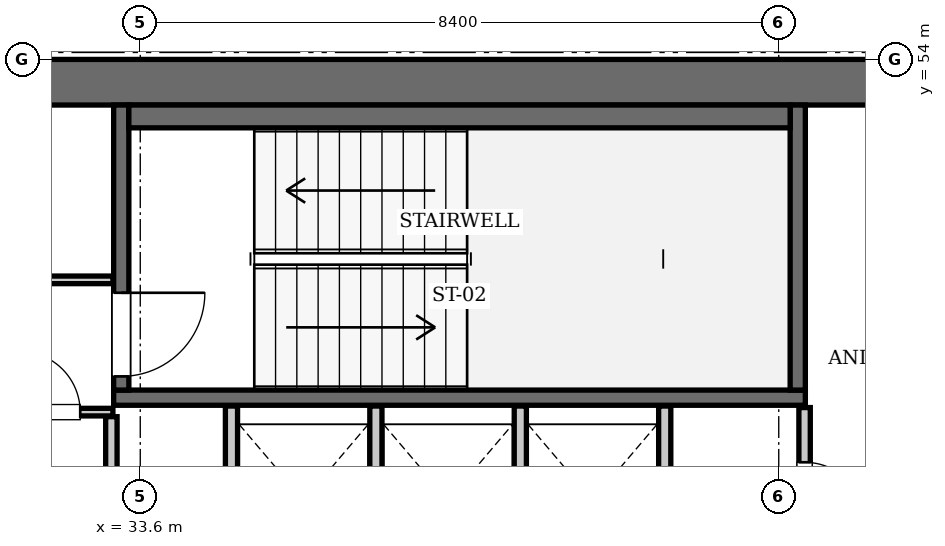
"""IFC4 building model, lengths in metres.
Left out: names, types, materials, properties, quantities, classifications, styles, units other than length and angle.
Written with IfcOpenShell. Run it as: python <this file> out.ifc"""

import sys

from ifc_helpers import new_model, si_unit, direction, frame, frame_2d, origin, place, context, subcontext, project, spatial, rectangle, extrude, element, fill, save


model = new_model("IFC4")
c1 = context("Model", 3, precision=1e-05, world=origin(), true_north=direction((0.0, 1.0)))
c2 = subcontext(c1, "Body", "Model", "MODEL_VIEW")
j1 = project(units=[si_unit("LENGTHUNIT", "METRE"), si_unit("PLANEANGLEUNIT", "RADIAN")], contexts=[c1])
p1 = place(None, origin())
s1 = spatial("IfcSite", under=j1, at=p1, CompositionType="ELEMENT")
p2 = place(p1, origin())
s2 = spatial("IfcBuilding", under=s1, at=p2, CompositionType="ELEMENT")
p3 = place(p2, frame((0.0, 0.0, 337.4)))
s3 = spatial("IfcBuildingStorey", under=s2, at=p3, CompositionType="ELEMENT", Elevation=337.4)
p4 = place(p3, frame((25.2, 53.7, 0.0), z_axis=(0.0, 0.0, 1.0), x_axis=(1.0, 0.0, 0.0)))
e1 = element("IfcWall", 1, at=p4, inside=s3, PredefinedType="SHEAR", context=c2, shape_type="SweptSolid", body=[
    extrude(rectangle(XDim=25.2, YDim=0.6, at=frame_2d((12.6, 0.0))), origin(), (0.0, 0.0, 1.0), 3.85),
])
p5 = place(p3, frame((33.25, 49.55, 0.0), z_axis=(0.0, 0.0, 1.0), x_axis=(1.0, 0.0, 0.0)))
e2 = element("IfcWall", 2, at=p5, inside=s3, PredefinedType="SOLIDWALL", context=c2, shape_type="SweptSolid", body=[
    extrude(rectangle(XDim=9.1, YDim=0.2, at=frame_2d((4.55, 0.0))), origin(), (0.0, 0.0, 1.0), 3.61),
])
p6 = place(p3, frame((42.25, 49.65, 0.0), z_axis=(0.0, 0.0, 1.0), x_axis=(0.0, 1.0, 0.0)))
e3 = element("IfcWall", 3, at=p6, inside=s3, PredefinedType="SOLIDWALL", context=c2, shape_type="SweptSolid", body=[
    extrude(rectangle(XDim=3.75, YDim=0.2, at=frame_2d((1.875, 0.0))), origin(), (0.0, 0.0, 1.0), 3.61),
])
p7 = place(p3, frame((33.35, 49.65, 0.0), z_axis=(0.0, 0.0, 1.0), x_axis=(0.0, 1.0, 0.0)))
e4 = element("IfcWall", 4, at=p7, inside=s3, PredefinedType="SOLIDWALL", context=c2, shape_type="SweptSolid", body=[
    extrude(rectangle(XDim=3.75, YDim=0.2, at=frame_2d((1.875, 0.0))), origin(), (0.0, 0.0, 1.0), 3.61),
])
p8 = place(p7, frame((0.18, 0.0, 0.0)))
e5 = element("IfcOpeningElement", 5, at=p8, cuts=e4, PredefinedType="OPENING", context=c2, shape_type="SweptSolid", body=[
    extrude(rectangle(XDim=1.1, YDim=2.15, at=frame_2d((0.55, 1.075))), frame((0.0, 0.11, 0.0), z_axis=(0.0, -1.0, 0.0), x_axis=(1.0, 0.0, 0.0)), (0.0, 0.0, 1.0), 0.22),
])
p9 = place(p3, frame((33.45, 53.25, 0.0), z_axis=(0.0, 0.0, 1.0), x_axis=(1.0, 0.0, 0.0)))
e6 = element("IfcWall", 6, at=p9, inside=s3, PredefinedType="SOLIDWALL", context=c2, shape_type="SweptSolid", body=[
    extrude(rectangle(XDim=8.7, YDim=0.3, at=frame_2d((4.35, 0.0))), origin(), (0.0, 0.0, 1.0), 3.61),
])
for number, where, z_axis, x_axis in (
    (7, (34.8, 47.25, 0.0), (0.0, 0.0, 1.0), (0.0, 1.0, 0.0)),
    (8, (36.7, 47.25, 0.0), (0.0, 0.0, 1.0), (0.0, 1.0, 0.0)),
    (9, (38.6, 47.25, 0.0), (0.0, 0.0, 1.0), (0.0, 1.0, 0.0)),
    (10, (40.5, 47.25, 0.0), (0.0, 0.0, 1.0), (0.0, 1.0, 0.0)),
):
    element("IfcWall", number, at=place(p3, frame(where, z_axis=z_axis, x_axis=x_axis)), inside=s3, PredefinedType="SOLIDWALL", context=c2, shape_type="SweptSolid", body=[
        extrude(rectangle(XDim=2.19, YDim=0.16, at=frame_2d((1.095, 0.0))), origin(), (0.0, 0.0, 1.0), 3.61),
    ])
p10 = place(p3, frame((33.22, 45.14, 0.0), z_axis=(0.0, 0.0, 1.0), x_axis=(0.0, 1.0, 0.0)))
e11 = element("IfcWall", 11, at=p10, inside=s3, PredefinedType="PARTITIONING", context=c2, shape_type="SweptSolid", body=[
    extrude(rectangle(XDim=4.16, YDim=0.15, at=frame_2d((2.08, 0.0))), origin(), (0.0, 0.0, 1.0), 3.61),
])
p11 = place(p3, frame((30.06, 49.36, 0.0), z_axis=(0.0, 0.0, 1.0), x_axis=(1.0, 0.0, 0.0)))
e12 = element("IfcWall", 12, at=p11, inside=s3, PredefinedType="PARTITIONING", context=c2, shape_type="SweptSolid", body=[
    extrude(rectangle(XDim=3.18, YDim=0.1, at=frame_2d((1.59, 0.0))), origin(), (0.0, 0.0, 1.0), 3.61),
])
p12 = place(p11, frame((1.95, 0.0, 0.0)))
e13 = element("IfcOpeningElement", 13, at=p12, cuts=e12, PredefinedType="OPENING", context=c2, shape_type="SweptSolid", body=[
    extrude(rectangle(XDim=0.8, YDim=2.05, at=frame_2d((0.4, 1.025))), frame((0.0, 0.06, 0.0), z_axis=(0.0, -1.0, 0.0), x_axis=(1.0, 0.0, 0.0)), (0.0, 0.0, 1.0), 0.12),
])
p13 = place(p3, frame((31.82, 51.1, 0.0), z_axis=(0.0, 0.0, 1.0), x_axis=(1.0, 0.0, 0.0)))
e14 = element("IfcWall", 14, at=p13, inside=s3, PredefinedType="PARTITIONING", context=c2, shape_type="SweptSolid", body=[
    extrude(rectangle(XDim=1.42, YDim=0.1, at=frame_2d((0.71, 0.0))), origin(), (0.0, 0.0, 1.0), 3.61),
])
p14 = place(p3, frame((42.34, 47.66, 0.0), z_axis=(0.0, 0.0, 1.0), x_axis=(0.0, 1.0, 0.0)))
e15 = element("IfcWall", 15, at=p14, inside=s3, PredefinedType="PARTITIONING", context=c2, shape_type="SweptSolid", body=[
    extrude(rectangle(XDim=1.76, YDim=0.15, at=frame_2d((0.88, 0.0))), origin(), (0.0, 0.0, 1.0), 3.61),
])
p15 = place(p14, frame((0.24, 0.0, 0.0)))
e16 = element("IfcOpeningElement", 16, at=p15, cuts=e15, PredefinedType="OPENING", context=c2, shape_type="SweptSolid", body=[
    extrude(rectangle(XDim=0.8, YDim=2.05, at=frame_2d((0.4, 1.025))), frame((0.0, 0.085, 0.0), z_axis=(0.0, -1.0, 0.0), x_axis=(1.0, 0.0, 0.0)), (0.0, 0.0, 1.0), 0.17),
])
p16 = place(p8, frame((1.1, 0.0, 0.0), z_axis=(0.0, 0.0, 1.0), x_axis=(-1.0, 0.0, 0.0)))
e17 = element("IfcDoor", 17, at=p16, inside=s3, OperationType="SINGLE_SWING_LEFT", PredefinedType="DOOR", context=c2, shape_type="SweptSolid", body=[
    extrude(rectangle(XDim=1.1, YDim=2.15, at=frame_2d((0.55, 1.075))), frame((0.0, 0.025, 0.0), z_axis=(0.0, -1.0, 0.0), x_axis=(1.0, 0.0, 0.0)), (0.0, 0.0, 1.0), 0.05),
])
fill(e5, e17)
p17 = place(p12, origin())
e18 = element("IfcDoor", 18, at=p17, inside=s3, OperationType="SINGLE_SWING_LEFT", PredefinedType="DOOR", context=c2, shape_type="SweptSolid", body=[
    extrude(rectangle(XDim=0.8, YDim=2.05, at=frame_2d((0.4, 1.025))), frame((0.0, 0.025, 0.0), z_axis=(0.0, -1.0, 0.0), x_axis=(1.0, 0.0, 0.0)), (0.0, 0.0, 1.0), 0.05),
])
fill(e13, e18)
p18 = place(p15, frame((0.8, 0.0, 0.0), z_axis=(0.0, 0.0, 1.0), x_axis=(-1.0, 0.0, 0.0)))
e19 = element("IfcDoor", 19, at=p18, inside=s3, OperationType="SINGLE_SWING_RIGHT", PredefinedType="DOOR", context=c2, shape_type="SweptSolid", body=[
    extrude(rectangle(XDim=0.8, YDim=2.05, at=frame_2d((0.4, 1.025))), frame((0.0, 0.025, 0.0), z_axis=(0.0, -1.0, 0.0), x_axis=(1.0, 0.0, 0.0)), (0.0, 0.0, 1.0), 0.05),
])
fill(e16, e19)
save(model, sys.argv[1])
